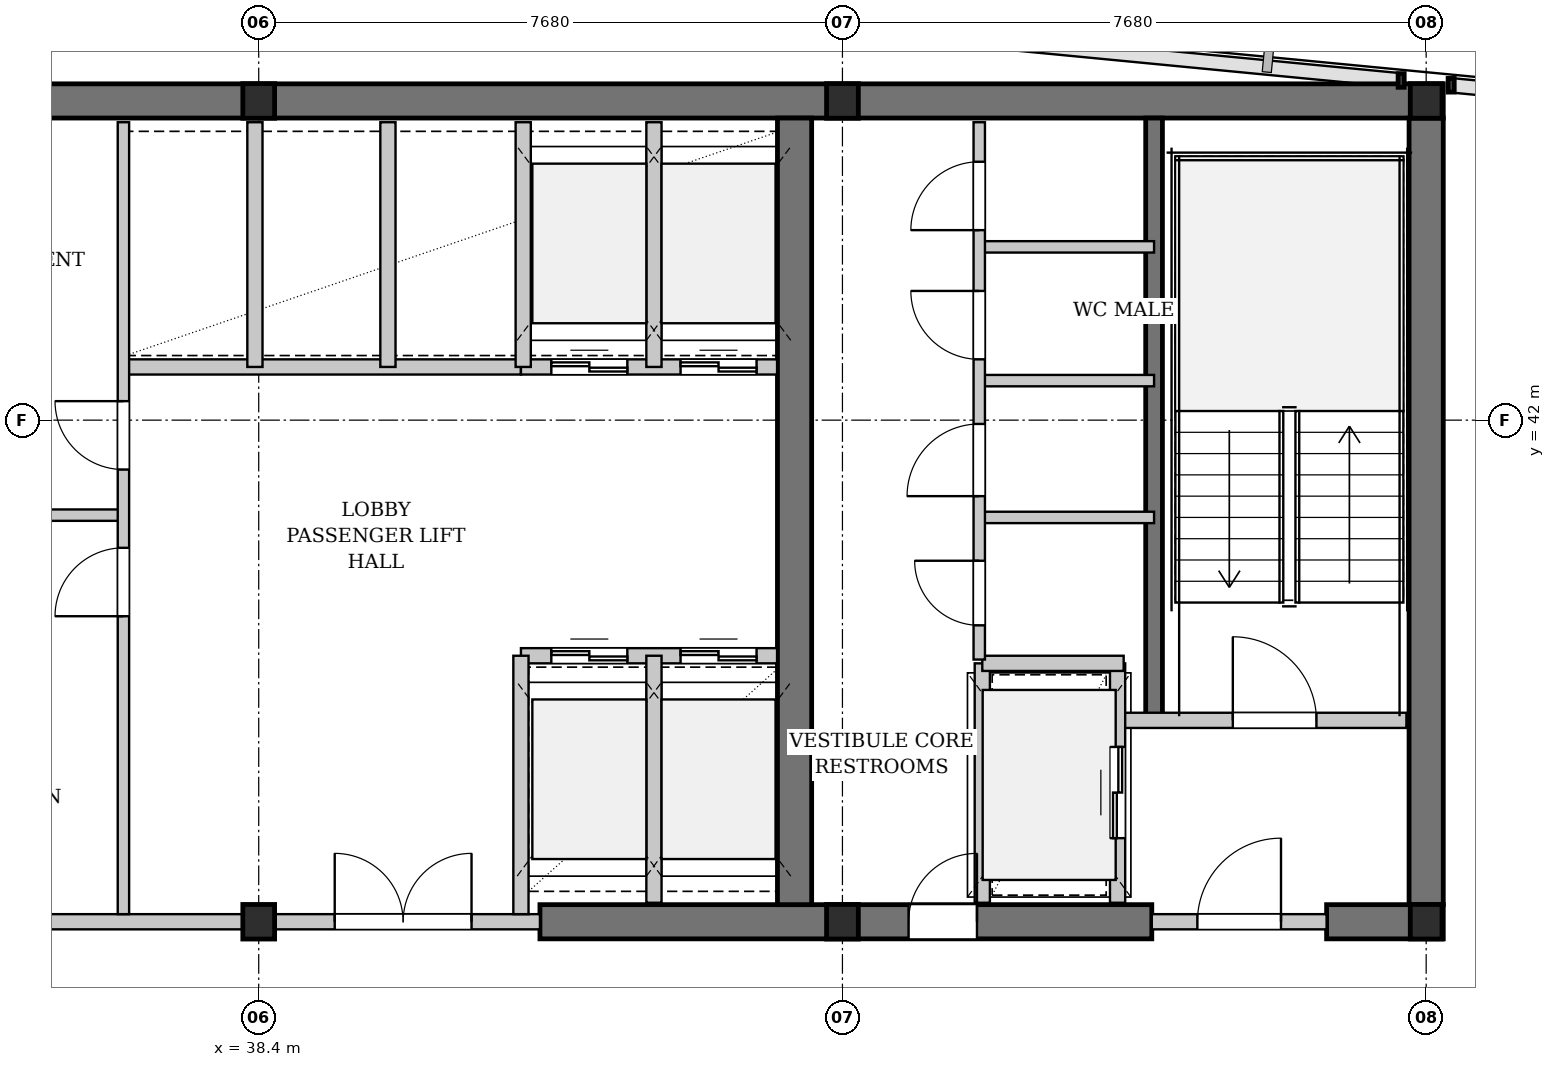
"""IFC4 building model, lengths in metres.
Left out: names, types, materials, properties, quantities, classifications, styles, units other than length and angle.
Written with IfcOpenShell. Run it as: python <this file> out.ifc"""

import sys

from ifc_helpers import new_model, si_unit, direction, frame, frame_2d, origin, origin_2d, place, context, subcontext, project, spatial, rectangle, i_section, extrude, element, fill, save


model = new_model("IFC4")
c1 = context("Model", 3, precision=1e-05, world=origin(), true_north=direction((0.0, 1.0)))
c2 = subcontext(c1, "Body", "Model", "MODEL_VIEW")
j1 = project(units=[si_unit("LENGTHUNIT", "METRE"), si_unit("PLANEANGLEUNIT", "RADIAN")], contexts=[c1])
p1 = place(None, origin())
s1 = spatial("IfcSite", under=j1, at=p1, CompositionType="ELEMENT")
p2 = place(p1, origin())
s2 = spatial("IfcBuilding", under=s1, at=p2, CompositionType="ELEMENT")
p3 = place(p2, frame((0.0, 0.0, 155.6)))
s3 = spatial("IfcBuildingStorey", under=s2, at=p3, CompositionType="ELEMENT", Elevation=155.6)
p4 = place(p3, frame((22.815, 46.2, 0.0), z_axis=(0.0, 0.0, 1.0), x_axis=(1.0, 0.0, 0.0)))
e1 = element("IfcWall", 1, at=p4, inside=s3, PredefinedType="SHEAR", context=c2, shape_type="SweptSolid", body=[
    extrude(rectangle(XDim=31.17, YDim=0.45, at=frame_2d((15.585, 0.0))), origin(), (0.0, 0.0, 1.0), 3.08),
])
p5 = place(p3, frame((42.1, 35.4, 0.0), z_axis=(0.0, 0.0, 1.0), x_axis=(1.0, 0.0, 0.0)))
e2 = element("IfcWall", 2, at=p5, inside=s3, PredefinedType="SHEAR", context=c2, shape_type="SweptSolid", body=[
    extrude(rectangle(XDim=8.05, YDim=0.45, at=frame_2d((4.025, 0.0))), origin(), (0.0, 0.0, 1.0), 3.08),
])
p6 = place(p5, frame((4.85, 0.0, 0.0)))
e3 = element("IfcOpeningElement", 3, at=p6, cuts=e2, PredefinedType="OPENING", context=c2, shape_type="SweptSolid", body=[
    extrude(rectangle(XDim=0.9, YDim=2.15, at=frame_2d((0.45, 1.075))), frame((0.0, 0.235, 0.0), z_axis=(0.0, -1.0, 0.0), x_axis=(1.0, 0.0, 0.0)), (0.0, 0.0, 1.0), 0.47),
])
p7 = place(p3, frame((52.45, 35.4, 0.0), z_axis=(0.0, 0.0, 1.0), x_axis=(1.0, 0.0, 0.0)))
e4 = element("IfcWall", 4, at=p7, inside=s3, PredefinedType="SHEAR", context=c2, shape_type="SweptSolid", body=[
    extrude(rectangle(XDim=1.535, YDim=0.45, at=frame_2d((0.768, 0.0))), origin(), (0.0, 0.0, 1.0), 3.08),
])
for number, where, z_axis, x_axis in (
    (5, (45.45, 35.625, 0.0), (0.0, 0.0, 1.0), (0.0, 1.0, 0.0)),
    (6, (53.76, 35.625, 0.0), (0.0, 0.0, 1.0), (0.0, 1.0, 0.0)),
):
    element("IfcWall", number, at=place(p3, frame(where, z_axis=z_axis, x_axis=x_axis)), inside=s3, PredefinedType="SHEAR", context=c2, shape_type="SweptSolid", body=[
        extrude(rectangle(XDim=10.35, YDim=0.45, at=frame_2d((5.175, 0.0))), origin(), (0.0, 0.0, 1.0), 3.08),
    ])
p8 = place(p3, frame((50.18, 38.05, 0.0), z_axis=(0.0, 0.0, 1.0), x_axis=(0.0, 1.0, 0.0)))
e7 = element("IfcWall", 7, at=p8, inside=s3, PredefinedType="SHEAR", context=c2, shape_type="SweptSolid", body=[
    extrude(rectangle(XDim=7.925, YDim=0.22, at=frame_2d((3.962, 0.0))), origin(), (0.0, 0.0, 1.0), 3.08),
])
for number, where, z_axis, x_axis in (
    (8, (38.4, 35.4, 0.0), (0.0, 0.0, 1.0), (1.0, 0.0, 0.0)),
    (9, (38.4, 46.2, 0.0), (0.0, 0.0, 1.0), (1.0, 0.0, 0.0)),
    (10, (46.08, 35.4, 0.0), (0.0, 0.0, 1.0), (1.0, 0.0, 0.0)),
    (11, (46.08, 46.2, 0.0), (0.0, 0.0, 1.0), (1.0, 0.0, 0.0)),
    (12, (53.76, 35.4, 0.0), (0.0, 0.0, 1.0), (1.0, 0.0, 0.0)),
    (13, (53.76, 46.2, 0.0), (0.0, 0.0, 1.0), (1.0, 0.0, 0.0)),
):
    element("IfcColumn", number, at=place(p3, frame(where, z_axis=z_axis, x_axis=x_axis)), inside=s3, PredefinedType="COLUMN", context=c2, shape_type="SweptSolid", body=[
        extrude(i_section(OverallWidth=0.418, OverallDepth=0.455, WebThickness=0.042, FlangeThickness=0.068, FilletRadius=0.015, at=origin_2d()), origin(), (0.0, 0.0, 1.0), 3.3),
    ])
p9 = place(p3, frame((35.6, 35.4, 0.0), z_axis=(0.0, 0.0, 1.0), x_axis=(1.0, 0.0, 0.0)))
e14 = element("IfcWall", 14, at=p9, inside=s3, PredefinedType="PARTITIONING", context=c2, shape_type="SweptSolid", body=[
    extrude(rectangle(XDim=6.5, YDim=0.2, at=frame_2d((3.25, 0.0))), origin(), (0.0, 0.0, 1.0), 2.475),
])
p10 = place(p9, frame((3.8, 0.0, 0.0)))
e15 = element("IfcOpeningElement", 15, at=p10, cuts=e14, PredefinedType="OPENING", context=c2, shape_type="SweptSolid", body=[
    extrude(rectangle(XDim=1.8, YDim=2.3, at=frame_2d((0.9, 1.15))), frame((0.0, 0.11, 0.0), z_axis=(0.0, -1.0, 0.0), x_axis=(1.0, 0.0, 0.0)), (0.0, 0.0, 1.0), 0.22),
])
p11 = place(p3, frame((36.6, 42.7, 0.0), z_axis=(0.0, 0.0, 1.0), x_axis=(1.0, 0.0, 0.0)))
e16 = element("IfcWall", 16, at=p11, inside=s3, PredefinedType="PARTITIONING", context=c2, shape_type="SweptSolid", body=[
    extrude(rectangle(XDim=5.25, YDim=0.2, at=frame_2d((2.625, 0.0))), origin(), (0.0, 0.0, 1.0), 3.08),
])
p12 = place(p3, frame((38.35, 42.7, 0.0), z_axis=(0.0, 0.0, 1.0), x_axis=(0.0, 1.0, 0.0)))
e17 = element("IfcWall", 17, at=p12, inside=s3, PredefinedType="PARTITIONING", context=c2, shape_type="SweptSolid", body=[
    extrude(rectangle(XDim=3.22, YDim=0.2, at=frame_2d((1.61, 0.0))), origin(), (0.0, 0.0, 1.0), 2.475),
])
p13 = place(p3, frame((40.1, 42.7, 0.0), z_axis=(0.0, 0.0, 1.0), x_axis=(0.0, 1.0, 0.0)))
e18 = element("IfcWall", 18, at=p13, inside=s3, PredefinedType="PARTITIONING", context=c2, shape_type="SweptSolid", body=[
    extrude(rectangle(XDim=3.22, YDim=0.2, at=frame_2d((1.61, 0.0))), origin(), (0.0, 0.0, 1.0), 3.08),
])
p14 = place(p3, frame((33.05, 40.75, 0.0), z_axis=(0.0, 0.0, 1.0), x_axis=(1.0, 0.0, 0.0)))
e19 = element("IfcWall", 19, at=p14, inside=s3, PredefinedType="PARTITIONING", context=c2, shape_type="SweptSolid", body=[
    extrude(rectangle(XDim=3.57, YDim=0.15, at=frame_2d((1.785, 0.0))), origin(), (0.0, 0.0, 1.0), 3.08),
])
p15 = place(p3, frame((36.62, 35.5, 0.0), z_axis=(0.0, 0.0, 1.0), x_axis=(0.0, 1.0, 0.0)))
e20 = element("IfcWall", 20, at=p15, inside=s3, PredefinedType="PARTITIONING", context=c2, shape_type="SweptSolid", body=[
    extrude(rectangle(XDim=10.42, YDim=0.15, at=frame_2d((5.21, 0.0))), origin(), (0.0, 0.0, 1.0), 3.08),
])
p16 = place(p15, frame((3.92, 0.0, 0.0)))
e21 = element("IfcOpeningElement", 21, at=p16, cuts=e20, PredefinedType="OPENING", context=c2, shape_type="SweptSolid", body=[
    extrude(rectangle(XDim=0.9, YDim=2.15, at=frame_2d((0.45, 1.075))), frame((0.0, 0.085, 0.0), z_axis=(0.0, -1.0, 0.0), x_axis=(1.0, 0.0, 0.0)), (0.0, 0.0, 1.0), 0.17),
])
p17 = place(p15, frame((5.85, 0.0, 0.0)))
e22 = element("IfcOpeningElement", 22, at=p17, cuts=e20, PredefinedType="OPENING", context=c2, shape_type="SweptSolid", body=[
    extrude(rectangle(XDim=0.9, YDim=2.15, at=frame_2d((0.45, 1.075))), frame((0.0, 0.085, 0.0), z_axis=(0.0, -1.0, 0.0), x_axis=(1.0, 0.0, 0.0)), (0.0, 0.0, 1.0), 0.17),
])
p18 = place(p3, frame((41.85, 38.9, 0.0), z_axis=(0.0, 0.0, 1.0), x_axis=(1.0, 0.0, 0.0)))
e23 = element("IfcWall", 23, at=p18, inside=s3, PredefinedType="PARTITIONING", context=c2, shape_type="SweptSolid", body=[
    extrude(rectangle(XDim=3.37, YDim=0.2, at=frame_2d((1.685, 0.0))), origin(), (0.0, 0.0, 1.0), 3.08),
])
p19 = place(p18, frame((0.4, 0.0, 0.0)))
e24 = element("IfcOpeningElement", 24, at=p19, cuts=e23, PredefinedType="OPENING", context=c2, shape_type="SweptSolid", body=[
    extrude(rectangle(XDim=1.0, YDim=2.2, at=frame_2d((0.5, 1.1))), frame((0.0, 0.11, 0.0), z_axis=(0.0, -1.0, 0.0), x_axis=(1.0, 0.0, 0.0)), (0.0, 0.0, 1.0), 0.22),
])
p20 = place(p18, frame((2.1, 0.0, 0.0)))
e25 = element("IfcOpeningElement", 25, at=p20, cuts=e23, PredefinedType="OPENING", context=c2, shape_type="SweptSolid", body=[
    extrude(rectangle(XDim=1.0, YDim=2.2, at=frame_2d((0.5, 1.1))), frame((0.0, 0.11, 0.0), z_axis=(0.0, -1.0, 0.0), x_axis=(1.0, 0.0, 0.0)), (0.0, 0.0, 1.0), 0.22),
])
p21 = place(p3, frame((41.85, 42.7, 0.0), z_axis=(0.0, 0.0, 1.0), x_axis=(1.0, 0.0, 0.0)))
e26 = element("IfcWall", 26, at=p21, inside=s3, PredefinedType="PARTITIONING", context=c2, shape_type="SweptSolid", body=[
    extrude(rectangle(XDim=3.37, YDim=0.2, at=frame_2d((1.685, 0.0))), origin(), (0.0, 0.0, 1.0), 3.08),
])
p22 = place(p21, frame((0.4, 0.0, 0.0)))
e27 = element("IfcOpeningElement", 27, at=p22, cuts=e26, PredefinedType="OPENING", context=c2, shape_type="SweptSolid", body=[
    extrude(rectangle(XDim=1.0, YDim=2.2, at=frame_2d((0.5, 1.1))), frame((0.0, 0.11, 0.0), z_axis=(0.0, -1.0, 0.0), x_axis=(1.0, 0.0, 0.0)), (0.0, 0.0, 1.0), 0.22),
])
p23 = place(p21, frame((2.1, 0.0, 0.0)))
e28 = element("IfcOpeningElement", 28, at=p23, cuts=e26, PredefinedType="OPENING", context=c2, shape_type="SweptSolid", body=[
    extrude(rectangle(XDim=1.0, YDim=2.2, at=frame_2d((0.5, 1.1))), frame((0.0, 0.11, 0.0), z_axis=(0.0, -1.0, 0.0), x_axis=(1.0, 0.0, 0.0)), (0.0, 0.0, 1.0), 0.22),
])
p24 = place(p3, frame((43.6, 35.65, 0.0), z_axis=(0.0, 0.0, 1.0), x_axis=(0.0, 1.0, 0.0)))
e29 = element("IfcWall", 29, at=p24, inside=s3, PredefinedType="PARTITIONING", context=c2, shape_type="SweptSolid", body=[
    extrude(rectangle(XDim=3.25, YDim=0.2, at=frame_2d((1.625, 0.0))), origin(), (0.0, 0.0, 1.0), 3.08),
])
p25 = place(p3, frame((43.6, 42.7, 0.0), z_axis=(0.0, 0.0, 1.0), x_axis=(0.0, 1.0, 0.0)))
e30 = element("IfcWall", 30, at=p25, inside=s3, PredefinedType="PARTITIONING", context=c2, shape_type="SweptSolid", body=[
    extrude(rectangle(XDim=3.22, YDim=0.2, at=frame_2d((1.61, 0.0))), origin(), (0.0, 0.0, 1.0), 3.08),
])
p26 = place(p3, frame((41.85, 35.5, 0.0), z_axis=(0.0, 0.0, 1.0), x_axis=(0.0, 1.0, 0.0)))
e31 = element("IfcWall", 31, at=p26, inside=s3, PredefinedType="PARTITIONING", context=c2, shape_type="SweptSolid", body=[
    extrude(rectangle(XDim=3.4, YDim=0.2, at=frame_2d((1.7, 0.0))), origin(), (0.0, 0.0, 1.0), 3.08),
])
p27 = place(p3, frame((41.88, 42.7, 0.0), z_axis=(0.0, 0.0, 1.0), x_axis=(0.0, 1.0, 0.0)))
e32 = element("IfcWall", 32, at=p27, inside=s3, PredefinedType="PARTITIONING", context=c2, shape_type="SweptSolid", body=[
    extrude(rectangle(XDim=3.22, YDim=0.2, at=frame_2d((1.61, 0.0))), origin(), (0.0, 0.0, 1.0), 3.08),
])
p28 = place(p3, frame((49.78, 38.05, 0.0), z_axis=(0.0, 0.0, 1.0), x_axis=(1.0, 0.0, 0.0)))
e33 = element("IfcWall", 33, at=p28, inside=s3, PredefinedType="PARTITIONING", context=c2, shape_type="SweptSolid", body=[
    extrude(rectangle(XDim=3.72, YDim=0.2, at=frame_2d((1.86, 0.0))), origin(), (0.0, 0.0, 1.0), 3.08),
])
p29 = place(p28, frame((1.436, 0.0, 0.0)))
e34 = element("IfcOpeningElement", 34, at=p29, cuts=e33, PredefinedType="OPENING", context=c2, shape_type="SweptSolid", body=[
    extrude(rectangle(XDim=1.1, YDim=2.15, at=frame_2d((0.55, 1.075))), frame((0.0, 0.11, 0.0), z_axis=(0.0, -1.0, 0.0), x_axis=(1.0, 0.0, 0.0)), (0.0, 0.0, 1.0), 0.22),
])
p30 = place(p3, frame((50.15, 35.4, 0.0), z_axis=(0.0, 0.0, 1.0), x_axis=(1.0, 0.0, 0.0)))
e35 = element("IfcWall", 35, at=p30, inside=s3, PredefinedType="PARTITIONING", context=c2, shape_type="SweptSolid", body=[
    extrude(rectangle(XDim=2.3, YDim=0.2, at=frame_2d((1.15, 0.0))), origin(), (0.0, 0.0, 1.0), 2.475),
])
p31 = place(p30, frame((0.6, 0.0, 0.0)))
e36 = element("IfcOpeningElement", 36, at=p31, cuts=e35, PredefinedType="OPENING", context=c2, shape_type="SweptSolid", body=[
    extrude(rectangle(XDim=1.1, YDim=2.15, at=frame_2d((0.55, 1.075))), frame((0.0, 0.11, 0.0), z_axis=(0.0, -1.0, 0.0), x_axis=(1.0, 0.0, 0.0)), (0.0, 0.0, 1.0), 0.22),
])
p32 = place(p3, frame((49.7, 35.65, 0.0), z_axis=(0.0, 0.0, 1.0), x_axis=(0.0, 1.0, 0.0)))
e37 = element("IfcWall", 37, at=p32, inside=s3, PredefinedType="PARTITIONING", context=c2, shape_type="SweptSolid", body=[
    extrude(rectangle(XDim=3.15, YDim=0.2, at=frame_2d((1.575, 0.0))), origin(), (0.0, 0.0, 1.0), 3.08),
])
p33 = place(p32, frame((0.85, 0.0, 0.0)))
e38 = element("IfcOpeningElement", 38, at=p33, cuts=e37, PredefinedType="OPENING", context=c2, shape_type="SweptSolid", body=[
    extrude(rectangle(XDim=1.2, YDim=2.2, at=frame_2d((0.6, 1.1))), frame((0.0, 0.11, 0.0), z_axis=(0.0, -1.0, 0.0), x_axis=(1.0, 0.0, 0.0)), (0.0, 0.0, 1.0), 0.22),
])
p34 = place(p3, frame((47.92, 35.65, 0.0), z_axis=(0.0, 0.0, 1.0), x_axis=(0.0, 1.0, 0.0)))
e39 = element("IfcWall", 39, at=p34, inside=s3, PredefinedType="PARTITIONING", context=c2, shape_type="SweptSolid", body=[
    extrude(rectangle(XDim=3.15, YDim=0.2, at=frame_2d((1.575, 0.0))), origin(), (0.0, 0.0, 1.0), 3.08),
])
p35 = place(p3, frame((47.92, 38.8, 0.0), z_axis=(0.0, 0.0, 1.0), x_axis=(1.0, 0.0, 0.0)))
e40 = element("IfcWall", 40, at=p35, inside=s3, PredefinedType="PARTITIONING", context=c2, shape_type="SweptSolid", body=[
    extrude(rectangle(XDim=1.86, YDim=0.2, at=frame_2d((0.93, 0.0))), origin(), (0.0, 0.0, 1.0), 3.08),
])
for number, where, z_axis, x_axis in (
    (41, (47.88, 40.72, 0.0), (0.0, 0.0, 1.0), (1.0, 0.0, 0.0)),
    (42, (47.88, 42.52, 0.0), (0.0, 0.0, 1.0), (1.0, 0.0, 0.0)),
    (43, (47.88, 44.28, 0.0), (0.0, 0.0, 1.0), (1.0, 0.0, 0.0)),
):
    element("IfcWall", number, at=place(p3, frame(where, z_axis=z_axis, x_axis=x_axis)), inside=s3, PredefinedType="PARTITIONING", context=c2, shape_type="SweptSolid", body=[
        extrude(rectangle(XDim=2.3, YDim=0.15, at=frame_2d((1.15, 0.0))), origin(), (0.0, 0.0, 1.0), 3.08),
    ])
p36 = place(p3, frame((47.88, 38.85, 0.0), z_axis=(0.0, 0.0, 1.0), x_axis=(0.0, 1.0, 0.0)))
e44 = element("IfcWall", 44, at=p36, inside=s3, PredefinedType="PARTITIONING", context=c2, shape_type="SweptSolid", body=[
    extrude(rectangle(XDim=7.07, YDim=0.15, at=frame_2d((3.535, 0.0))), origin(), (0.0, 0.0, 1.0), 3.08),
])
p37 = place(p36, frame((0.45, 0.0, 0.0)))
e45 = element("IfcOpeningElement", 45, at=p37, cuts=e44, PredefinedType="OPENING", context=c2, shape_type="SweptSolid", body=[
    extrude(rectangle(XDim=0.85, YDim=2.15, at=frame_2d((0.425, 1.075))), frame((0.0, 0.085, 0.0), z_axis=(0.0, -1.0, 0.0), x_axis=(1.0, 0.0, 0.0)), (0.0, 0.0, 1.0), 0.17),
])
p38 = place(p36, frame((2.15, 0.0, 0.0)))
e46 = element("IfcOpeningElement", 46, at=p38, cuts=e44, PredefinedType="OPENING", context=c2, shape_type="SweptSolid", body=[
    extrude(rectangle(XDim=0.95, YDim=2.15, at=frame_2d((0.475, 1.075))), frame((0.0, 0.085, 0.0), z_axis=(0.0, -1.0, 0.0), x_axis=(1.0, 0.0, 0.0)), (0.0, 0.0, 1.0), 0.17),
])
p39 = place(p36, frame((3.95, 0.0, 0.0)))
e47 = element("IfcOpeningElement", 47, at=p39, cuts=e44, PredefinedType="OPENING", context=c2, shape_type="SweptSolid", body=[
    extrude(rectangle(XDim=0.9, YDim=2.15, at=frame_2d((0.45, 1.075))), frame((0.0, 0.085, 0.0), z_axis=(0.0, -1.0, 0.0), x_axis=(1.0, 0.0, 0.0)), (0.0, 0.0, 1.0), 0.17),
])
p40 = place(p36, frame((5.65, 0.0, 0.0)))
e48 = element("IfcOpeningElement", 48, at=p40, cuts=e44, PredefinedType="OPENING", context=c2, shape_type="SweptSolid", body=[
    extrude(rectangle(XDim=0.9, YDim=2.15, at=frame_2d((0.45, 1.075))), frame((0.0, 0.085, 0.0), z_axis=(0.0, -1.0, 0.0), x_axis=(1.0, 0.0, 0.0)), (0.0, 0.0, 1.0), 0.17),
])
p41 = place(p10, origin())
e49 = element("IfcDoor", 49, at=p41, inside=s3, OperationType="DOUBLE_DOOR_SINGLE_SWING", PredefinedType="DOOR", context=c2, shape_type="SweptSolid", body=[
    extrude(rectangle(XDim=1.8, YDim=2.3, at=frame_2d((0.9, 1.15))), frame((0.0, 0.025, 0.0), z_axis=(0.0, -1.0, 0.0), x_axis=(1.0, 0.0, 0.0)), (0.0, 0.0, 1.0), 0.05),
])
fill(e15, e49)
p42 = place(p16, origin())
e50 = element("IfcDoor", 50, at=p42, inside=s3, OperationType="SINGLE_SWING_LEFT", PredefinedType="DOOR", context=c2, shape_type="SweptSolid", body=[
    extrude(rectangle(XDim=0.9, YDim=2.15, at=frame_2d((0.45, 1.075))), frame((0.0, 0.025, 0.0), z_axis=(0.0, -1.0, 0.0), x_axis=(1.0, 0.0, 0.0)), (0.0, 0.0, 1.0), 0.05),
])
fill(e21, e50)
p43 = place(p17, origin())
e51 = element("IfcDoor", 51, at=p43, inside=s3, OperationType="SINGLE_SWING_RIGHT", PredefinedType="DOOR", context=c2, shape_type="SweptSolid", body=[
    extrude(rectangle(XDim=0.9, YDim=2.15, at=frame_2d((0.45, 1.075))), frame((0.0, 0.025, 0.0), z_axis=(0.0, -1.0, 0.0), x_axis=(1.0, 0.0, 0.0)), (0.0, 0.0, 1.0), 0.05),
])
fill(e22, e51)
p44 = place(p19, origin())
e52 = element("IfcDoor", 52, at=p44, inside=s3, OperationType="DOUBLE_DOOR_SLIDING", PredefinedType="DOOR", context=c2, shape_type="SweptSolid", body=[
    extrude(rectangle(XDim=1.0, YDim=2.2, at=frame_2d((0.5, 1.1))), frame((0.0, 0.025, 0.0), z_axis=(0.0, -1.0, 0.0), x_axis=(1.0, 0.0, 0.0)), (0.0, 0.0, 1.0), 0.05),
])
fill(e24, e52)
p45 = place(p20, origin())
e53 = element("IfcDoor", 53, at=p45, inside=s3, OperationType="DOUBLE_DOOR_SLIDING", PredefinedType="DOOR", context=c2, shape_type="SweptSolid", body=[
    extrude(rectangle(XDim=1.0, YDim=2.2, at=frame_2d((0.5, 1.1))), frame((0.0, 0.025, 0.0), z_axis=(0.0, -1.0, 0.0), x_axis=(1.0, 0.0, 0.0)), (0.0, 0.0, 1.0), 0.05),
])
fill(e25, e53)
p46 = place(p22, origin())
e54 = element("IfcDoor", 54, at=p46, inside=s3, OperationType="DOUBLE_DOOR_SLIDING", PredefinedType="DOOR", context=c2, shape_type="SweptSolid", body=[
    extrude(rectangle(XDim=1.0, YDim=2.2, at=frame_2d((0.5, 1.1))), frame((0.0, 0.025, 0.0), z_axis=(0.0, -1.0, 0.0), x_axis=(1.0, 0.0, 0.0)), (0.0, 0.0, 1.0), 0.05),
])
fill(e27, e54)
p47 = place(p23, origin())
e55 = element("IfcDoor", 55, at=p47, inside=s3, OperationType="DOUBLE_DOOR_SLIDING", PredefinedType="DOOR", context=c2, shape_type="SweptSolid", body=[
    extrude(rectangle(XDim=1.0, YDim=2.2, at=frame_2d((0.5, 1.1))), frame((0.0, 0.025, 0.0), z_axis=(0.0, -1.0, 0.0), x_axis=(1.0, 0.0, 0.0)), (0.0, 0.0, 1.0), 0.05),
])
fill(e28, e55)
p48 = place(p29, origin())
e56 = element("IfcDoor", 56, at=p48, inside=s3, OperationType="SINGLE_SWING_LEFT", PredefinedType="DOOR", context=c2, shape_type="SweptSolid", body=[
    extrude(rectangle(XDim=1.1, YDim=2.15, at=frame_2d((0.55, 1.075))), frame((0.0, 0.025, 0.0), z_axis=(0.0, -1.0, 0.0), x_axis=(1.0, 0.0, 0.0)), (0.0, 0.0, 1.0), 0.05),
])
fill(e34, e56)
p49 = place(p31, origin())
e57 = element("IfcDoor", 57, at=p49, inside=s3, OperationType="SINGLE_SWING_RIGHT", PredefinedType="DOOR", context=c2, shape_type="SweptSolid", body=[
    extrude(rectangle(XDim=1.1, YDim=2.15, at=frame_2d((0.55, 1.075))), frame((0.0, 0.025, 0.0), z_axis=(0.0, -1.0, 0.0), x_axis=(1.0, 0.0, 0.0)), (0.0, 0.0, 1.0), 0.05),
])
fill(e36, e57)
p50 = place(p33, origin())
e58 = element("IfcDoor", 58, at=p50, inside=s3, OperationType="DOUBLE_DOOR_SLIDING", PredefinedType="DOOR", context=c2, shape_type="SweptSolid", body=[
    extrude(rectangle(XDim=1.2, YDim=2.2, at=frame_2d((0.6, 1.1))), frame((0.0, 0.025, 0.0), z_axis=(0.0, -1.0, 0.0), x_axis=(1.0, 0.0, 0.0)), (0.0, 0.0, 1.0), 0.05),
])
fill(e38, e58)
p51 = place(p37, origin())
e59 = element("IfcDoor", 59, at=p51, inside=s3, OperationType="SINGLE_SWING_RIGHT", PredefinedType="DOOR", context=c2, shape_type="SweptSolid", body=[
    extrude(rectangle(XDim=0.85, YDim=2.15, at=frame_2d((0.425, 1.075))), frame((0.0, 0.025, 0.0), z_axis=(0.0, -1.0, 0.0), x_axis=(1.0, 0.0, 0.0)), (0.0, 0.0, 1.0), 0.05),
])
fill(e45, e59)
p52 = place(p38, origin())
e60 = element("IfcDoor", 60, at=p52, inside=s3, OperationType="SINGLE_SWING_LEFT", PredefinedType="DOOR", context=c2, shape_type="SweptSolid", body=[
    extrude(rectangle(XDim=0.95, YDim=2.15, at=frame_2d((0.475, 1.075))), frame((0.0, 0.025, 0.0), z_axis=(0.0, -1.0, 0.0), x_axis=(1.0, 0.0, 0.0)), (0.0, 0.0, 1.0), 0.05),
])
fill(e46, e60)
p53 = place(p39, origin())
e61 = element("IfcDoor", 61, at=p53, inside=s3, OperationType="SINGLE_SWING_RIGHT", PredefinedType="DOOR", context=c2, shape_type="SweptSolid", body=[
    extrude(rectangle(XDim=0.9, YDim=2.15, at=frame_2d((0.45, 1.075))), frame((0.0, 0.025, 0.0), z_axis=(0.0, -1.0, 0.0), x_axis=(1.0, 0.0, 0.0)), (0.0, 0.0, 1.0), 0.05),
])
fill(e47, e61)
p54 = place(p40, origin())
e62 = element("IfcDoor", 62, at=p54, inside=s3, OperationType="SINGLE_SWING_LEFT", PredefinedType="DOOR", context=c2, shape_type="SweptSolid", body=[
    extrude(rectangle(XDim=0.9, YDim=2.15, at=frame_2d((0.45, 1.075))), frame((0.0, 0.025, 0.0), z_axis=(0.0, -1.0, 0.0), x_axis=(1.0, 0.0, 0.0)), (0.0, 0.0, 1.0), 0.05),
])
fill(e48, e62)
p55 = place(p6, origin())
e63 = element("IfcDoor", 63, at=p55, inside=s3, OperationType="SINGLE_SWING_RIGHT", PredefinedType="DOOR", context=c2, shape_type="SweptSolid", body=[
    extrude(rectangle(XDim=0.9, YDim=2.15, at=frame_2d((0.45, 1.075))), frame((0.0, 0.025, 0.0), z_axis=(0.0, -1.0, 0.0), x_axis=(1.0, 0.0, 0.0)), (0.0, 0.0, 1.0), 0.05),
])
fill(e3, e63)
save(model, sys.argv[1])
